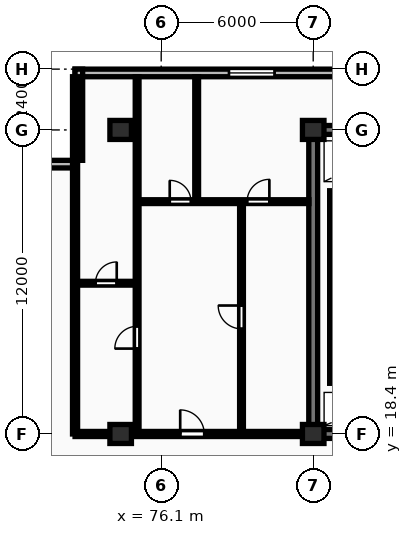
"""IFC4 building model, lengths in metres.
Left out: names, types, materials, properties, quantities, classifications, styles, units other than length and angle.
Written with IfcOpenShell. Run it as: python <this file> out.ifc"""

import sys

from ifc_helpers import new_model, si_unit, direction, frame, frame_2d, origin, origin_2d, place, context, subcontext, project, spatial, rectangle, extrude, element, fill, save


model = new_model("IFC4")
c1 = context("Model", 3, precision=1e-05, world=origin(), true_north=direction((0.0, 1.0)))
c2 = subcontext(c1, "Body", "Model", "MODEL_VIEW")
j1 = project(units=[si_unit("LENGTHUNIT", "METRE"), si_unit("PLANEANGLEUNIT", "RADIAN")], contexts=[c1])
p1 = place(None, origin())
s1 = spatial("IfcSite", under=j1, at=p1, CompositionType="ELEMENT")
p2 = place(p1, origin())
s2 = spatial("IfcBuilding", under=s1, at=p2, CompositionType="ELEMENT")
p3 = place(p2, frame((0.0, 0.0, 132.8)))
s3 = spatial("IfcBuildingStorey", under=s2, at=p3, CompositionType="ELEMENT", Elevation=132.8)
for number, where, z_axis, x_axis in (
    (1, (74.5, 18.4, 0.0), (0.0, 0.0, 1.0), (1.0, 0.0, 0.0)),
    (2, (74.5, 30.4, 0.0), (0.0, 0.0, 1.0), (1.0, 0.0, 0.0)),
    (3, (82.1, 18.4, 0.0), (0.0, 0.0, 1.0), (1.0, 0.0, 0.0)),
    (4, (82.1, 30.4, 0.0), (0.0, 0.0, 1.0), (1.0, 0.0, 0.0)),
):
    element("IfcColumn", number, at=place(p3, frame(where, z_axis=z_axis, x_axis=x_axis)), inside=s3, PredefinedType="COLUMN", context=c2, shape_type="SweptSolid", body=[
        extrude(rectangle(XDim=0.85, YDim=0.75, at=origin_2d()), origin(), (0.0, 0.0, 1.0), 3.25),
    ])
p4 = place(p3, frame((130.7, 32.65, 0.0), z_axis=(0.0, 0.0, 1.0), x_axis=(-1.0, 0.0, 0.0)))
e5 = element("IfcWall", 5, at=p4, inside=s3, PredefinedType="STANDARD", context=c2, shape_type="SweptSolid", body=[
    extrude(rectangle(XDim=58.0, YDim=0.3, at=frame_2d((29.0, 0.0))), origin(), (0.0, 0.0, 1.0), 2.97),
])
p5 = place(p4, frame((50.125, 0.0, 0.85)))
e6 = element("IfcOpeningElement", 6, at=p5, cuts=e5, PredefinedType="OPENING", context=c2, shape_type="SweptSolid", body=[
    extrude(rectangle(XDim=1.8, YDim=1.8, at=frame_2d((0.9, 0.9))), frame((0.0, 0.16, 0.0), z_axis=(0.0, -1.0, 0.0), x_axis=(1.0, 0.0, 0.0)), (0.0, 0.0, 1.0), 0.32),
])
p6 = place(p4, frame((6.775, 0.0, 0.85)))
e7 = element("IfcOpeningElement", 7, at=p6, cuts=e5, PredefinedType="OPENING", context=c2, shape_type="SweptSolid", body=[
    extrude(rectangle(XDim=1.8, YDim=1.8, at=frame_2d((0.9, 0.9))), frame((0.0, 0.16, 0.0), z_axis=(0.0, -1.0, 0.0), x_axis=(1.0, 0.0, 0.0)), (0.0, 0.0, 1.0), 0.32),
])
p7 = place(p3, frame((72.85, 32.8, 0.0), z_axis=(0.0, 0.0, 1.0), x_axis=(0.0, -1.0, 0.0)))
e8 = element("IfcWall", 8, at=p7, inside=s3, PredefinedType="STANDARD", context=c2, shape_type="SweptSolid", body=[
    extrude(rectangle(XDim=3.6, YDim=0.3, at=frame_2d((1.8, 0.0))), origin(), (0.0, 0.0, 1.0), 2.97),
])
p8 = place(p3, frame((72.7, 29.05, 0.0), z_axis=(0.0, 0.0, 1.0), x_axis=(-1.0, 0.0, 0.0)))
e9 = element("IfcWall", 9, at=p8, inside=s3, PredefinedType="STANDARD", context=c2, shape_type="SweptSolid", body=[
    extrude(rectangle(XDim=3.6, YDim=0.3, at=frame_2d((1.8, 0.0))), origin(), (0.0, 0.0, 1.0), 2.97),
])
p9 = place(p3, frame((81.925, 30.4, 0.0), z_axis=(0.0, 0.0, 1.0), x_axis=(1.0, 0.0, 0.0)))
e10 = element("IfcWall", 10, at=p9, inside=s3, PredefinedType="SHEAR", context=c2, shape_type="SweptSolid", body=[
    extrude(rectangle(XDim=36.265, YDim=0.35, at=frame_2d((18.132, 0.0))), origin(), (0.0, 0.0, 1.0), 3.25),
])
p10 = place(p3, frame((82.1, 18.575, 0.0), z_axis=(0.0, 0.0, 1.0), x_axis=(0.0, 1.0, 0.0)))
e11 = element("IfcWall", 11, at=p10, inside=s3, PredefinedType="SHEAR", context=c2, shape_type="SweptSolid", body=[
    extrude(rectangle(XDim=11.65, YDim=0.35, at=frame_2d((5.825, 0.0))), origin(), (0.0, 0.0, 1.0), 3.25),
])
p11 = place(p3, frame((81.925, 18.4, 0.0), z_axis=(0.0, 0.0, 1.0), x_axis=(1.0, 0.0, 0.0)))
e12 = element("IfcWall", 12, at=p11, inside=s3, PredefinedType="SHEAR", context=c2, shape_type="SweptSolid", body=[
    extrude(rectangle(XDim=36.265, YDim=0.35, at=frame_2d((18.132, 0.0))), origin(), (0.0, 0.0, 1.0), 3.25),
])
p12 = place(p11, frame((5.675, 0.0, 0.0)))
e13 = element("IfcOpeningElement", 13, at=p12, cuts=e12, PredefinedType="OPENING", context=c2, shape_type="SweptSolid", body=[
    extrude(rectangle(XDim=1.0, YDim=2.15, at=frame_2d((0.5, 1.075))), frame((0.0, 0.185, 0.0), z_axis=(0.0, -1.0, 0.0), x_axis=(1.0, 0.0, 0.0)), (0.0, 0.0, 1.0), 0.37),
])
p13 = place(p11, frame((21.925, 0.0, 0.0)))
e14 = element("IfcOpeningElement", 14, at=p13, cuts=e12, PredefinedType="OPENING", context=c2, shape_type="SweptSolid", body=[
    extrude(rectangle(XDim=1.5, YDim=2.2, at=frame_2d((0.75, 1.1))), frame((0.0, 0.185, 0.0), z_axis=(0.0, -1.0, 0.0), x_axis=(1.0, 0.0, 0.0)), (0.0, 0.0, 1.0), 0.37),
])
p14 = place(p11, frame((29.875, 0.0, 0.0)))
e15 = element("IfcOpeningElement", 15, at=p14, cuts=e12, PredefinedType="OPENING", context=c2, shape_type="SweptSolid", body=[
    extrude(rectangle(XDim=1.0, YDim=2.15, at=frame_2d((0.5, 1.075))), frame((0.0, 0.185, 0.0), z_axis=(0.0, -1.0, 0.0), x_axis=(1.0, 0.0, 0.0)), (0.0, 0.0, 1.0), 0.37),
])
p15 = place(p3, frame((82.875, 20.4, 0.0), z_axis=(0.0, 0.0, 1.0), x_axis=(0.0, 1.0, 0.0)))
e16 = element("IfcWall", 16, at=p15, inside=s3, PredefinedType="SHEAR", context=c2, shape_type="SweptSolid", body=[
    extrude(rectangle(XDim=7.6, YDim=0.25, at=frame_2d((3.8, 0.0))), origin(), (0.0, 0.0, 1.0), 3.25),
])
p16 = place(p3, frame((72.7, 18.4, 0.0), z_axis=(0.0, 0.0, 1.0), x_axis=(0.0, 1.0, 0.0)))
e17 = element("IfcWall", 17, at=p16, inside=s3, PredefinedType="PARTITIONING", context=c2, shape_type="SweptSolid", body=[
    extrude(rectangle(XDim=14.1, YDim=0.2, at=frame_2d((7.05, 0.0))), origin(), (0.0, 0.0, 1.0), 2.97),
])
p17 = place(p3, frame((72.7, 24.35, 0.0), z_axis=(0.0, 0.0, 1.0), x_axis=(1.0, 0.0, 0.0)))
e18 = element("IfcWall", 18, at=p17, inside=s3, PredefinedType="PARTITIONING", context=c2, shape_type="SweptSolid", body=[
    extrude(rectangle(XDim=2.45, YDim=0.15, at=frame_2d((1.225, 0.0))), origin(), (0.0, 0.0, 1.0), 2.97),
])
p18 = place(p17, frame((0.805, 0.0, 0.0)))
e19 = element("IfcOpeningElement", 19, at=p18, cuts=e18, PredefinedType="OPENING", context=c2, shape_type="SweptSolid", body=[
    extrude(rectangle(XDim=0.84, YDim=2.04, at=frame_2d((0.42, 1.02))), frame((0.0, 0.085, 0.0), z_axis=(0.0, -1.0, 0.0), x_axis=(1.0, 0.0, 0.0)), (0.0, 0.0, 1.0), 0.17),
])
p19 = place(p3, frame((75.15, 18.45, 0.0), z_axis=(0.0, 0.0, 1.0), x_axis=(0.0, 1.0, 0.0)))
e20 = element("IfcWall", 20, at=p19, inside=s3, PredefinedType="PARTITIONING", context=c2, shape_type="SweptSolid", body=[
    extrude(rectangle(XDim=14.05, YDim=0.15, at=frame_2d((7.025, 0.0))), origin(), (0.0, 0.0, 1.0), 2.97),
])
p20 = place(p19, frame((3.32, 0.0, 0.0)))
e21 = element("IfcOpeningElement", 21, at=p20, cuts=e20, PredefinedType="OPENING", context=c2, shape_type="SweptSolid", body=[
    extrude(rectangle(XDim=0.88, YDim=2.06, at=frame_2d((0.44, 1.03))), frame((0.0, 0.085, 0.0), z_axis=(0.0, -1.0, 0.0), x_axis=(1.0, 0.0, 0.0)), (0.0, 0.0, 1.0), 0.17),
])
p21 = place(p3, frame((79.27, 18.45, 0.0), z_axis=(0.0, 0.0, 1.0), x_axis=(0.0, 1.0, 0.0)))
e22 = element("IfcWall", 22, at=p21, inside=s3, PredefinedType="PARTITIONING", context=c2, shape_type="SweptSolid", body=[
    extrude(rectangle(XDim=9.12, YDim=0.15, at=frame_2d((4.56, 0.0))), origin(), (0.0, 0.0, 1.0), 2.97),
])
p22 = place(p21, frame((4.1, 0.0, 0.0)))
e23 = element("IfcOpeningElement", 23, at=p22, cuts=e22, PredefinedType="OPENING", context=c2, shape_type="SweptSolid", body=[
    extrude(rectangle(XDim=0.92, YDim=2.08, at=frame_2d((0.46, 1.04))), frame((0.0, 0.085, 0.0), z_axis=(0.0, -1.0, 0.0), x_axis=(1.0, 0.0, 0.0)), (0.0, 0.0, 1.0), 0.17),
])
p23 = place(p3, frame((77.5, 27.57, 0.0), z_axis=(0.0, 0.0, 1.0), x_axis=(0.0, 1.0, 0.0)))
e24 = element("IfcWall", 24, at=p23, inside=s3, PredefinedType="PARTITIONING", context=c2, shape_type="SweptSolid", body=[
    extrude(rectangle(XDim=4.93, YDim=0.15, at=frame_2d((2.465, 0.0))), origin(), (0.0, 0.0, 1.0), 2.97),
])
p24 = place(p3, frame((75.17, 27.57, 0.0), z_axis=(0.0, 0.0, 1.0), x_axis=(1.0, 0.0, 0.0)))
e25 = element("IfcWall", 25, at=p24, inside=s3, PredefinedType="PARTITIONING", context=c2, shape_type="SweptSolid", body=[
    extrude(rectangle(XDim=6.76, YDim=0.15, at=frame_2d((3.38, 0.0))), origin(), (0.0, 0.0, 1.0), 2.97),
])
p25 = place(p24, frame((1.266, 0.0, 0.0)))
e26 = element("IfcOpeningElement", 26, at=p25, cuts=e25, PredefinedType="OPENING", context=c2, shape_type="SweptSolid", body=[
    extrude(rectangle(XDim=0.84, YDim=2.04, at=frame_2d((0.42, 1.02))), frame((0.0, 0.085, 0.0), z_axis=(0.0, -1.0, 0.0), x_axis=(1.0, 0.0, 0.0)), (0.0, 0.0, 1.0), 0.17),
])
p26 = place(p24, frame((4.32, 0.0, 0.0)))
e27 = element("IfcOpeningElement", 27, at=p26, cuts=e25, PredefinedType="OPENING", context=c2, shape_type="SweptSolid", body=[
    extrude(rectangle(XDim=0.88, YDim=2.06, at=frame_2d((0.44, 1.03))), frame((0.0, 0.085, 0.0), z_axis=(0.0, -1.0, 0.0), x_axis=(1.0, 0.0, 0.0)), (0.0, 0.0, 1.0), 0.17),
])
p27 = place(p3, frame((72.7, 18.4, 0.0), z_axis=(0.0, 0.0, 1.0), x_axis=(1.0, 0.0, 0.0)))
e28 = element("IfcWall", 28, at=p27, inside=s3, PredefinedType="PARTITIONING", context=c2, shape_type="SweptSolid", body=[
    extrude(rectangle(XDim=9.25, YDim=0.2, at=frame_2d((4.625, 0.0))), origin(), (0.0, 0.0, 1.0), 2.358),
])
p28 = place(p27, frame((4.15, 0.0, 0.0)))
e29 = element("IfcOpeningElement", 29, at=p28, cuts=e28, PredefinedType="OPENING", context=c2, shape_type="SweptSolid", body=[
    extrude(rectangle(XDim=0.95, YDim=2.15, at=frame_2d((0.475, 1.075))), frame((0.0, 0.11, 0.0), z_axis=(0.0, -1.0, 0.0), x_axis=(1.0, 0.0, 0.0)), (0.0, 0.0, 1.0), 0.22),
])
p29 = place(p5, origin())
e30 = element("IfcWindow", 30, at=p29, inside=s3, PartitioningType="SINGLE_PANEL", PredefinedType="WINDOW", context=c2, shape_type="SweptSolid", body=[
    extrude(rectangle(XDim=1.8, YDim=1.8, at=frame_2d((0.9, 0.9))), frame((0.0, 0.03, 0.0), z_axis=(0.0, -1.0, 0.0), x_axis=(1.0, 0.0, 0.0)), (0.0, 0.0, 1.0), 0.06),
])
fill(e6, e30)
p30 = place(p18, origin())
e31 = element("IfcDoor", 31, at=p30, inside=s3, OperationType="SINGLE_SWING_RIGHT", PredefinedType="DOOR", context=c2, shape_type="SweptSolid", body=[
    extrude(rectangle(XDim=0.84, YDim=2.04, at=frame_2d((0.42, 1.02))), frame((0.0, 0.025, 0.0), z_axis=(0.0, -1.0, 0.0), x_axis=(1.0, 0.0, 0.0)), (0.0, 0.0, 1.0), 0.05),
])
fill(e19, e31)
p31 = place(p20, origin())
e32 = element("IfcDoor", 32, at=p31, inside=s3, OperationType="SINGLE_SWING_LEFT", PredefinedType="DOOR", context=c2, shape_type="SweptSolid", body=[
    extrude(rectangle(XDim=0.88, YDim=2.06, at=frame_2d((0.44, 1.03))), frame((0.0, 0.025, 0.0), z_axis=(0.0, -1.0, 0.0), x_axis=(1.0, 0.0, 0.0)), (0.0, 0.0, 1.0), 0.05),
])
fill(e21, e32)
p32 = place(p22, origin())
e33 = element("IfcDoor", 33, at=p32, inside=s3, OperationType="SINGLE_SWING_RIGHT", PredefinedType="DOOR", context=c2, shape_type="SweptSolid", body=[
    extrude(rectangle(XDim=0.92, YDim=2.08, at=frame_2d((0.46, 1.04))), frame((0.0, 0.025, 0.0), z_axis=(0.0, -1.0, 0.0), x_axis=(1.0, 0.0, 0.0)), (0.0, 0.0, 1.0), 0.05),
])
fill(e23, e33)
p33 = place(p25, origin())
e34 = element("IfcDoor", 34, at=p33, inside=s3, OperationType="SINGLE_SWING_LEFT", PredefinedType="DOOR", context=c2, shape_type="SweptSolid", body=[
    extrude(rectangle(XDim=0.84, YDim=2.04, at=frame_2d((0.42, 1.02))), frame((0.0, 0.025, 0.0), z_axis=(0.0, -1.0, 0.0), x_axis=(1.0, 0.0, 0.0)), (0.0, 0.0, 1.0), 0.05),
])
fill(e26, e34)
p34 = place(p26, origin())
e35 = element("IfcDoor", 35, at=p34, inside=s3, OperationType="SINGLE_SWING_RIGHT", PredefinedType="DOOR", context=c2, shape_type="SweptSolid", body=[
    extrude(rectangle(XDim=0.88, YDim=2.06, at=frame_2d((0.44, 1.03))), frame((0.0, 0.025, 0.0), z_axis=(0.0, -1.0, 0.0), x_axis=(1.0, 0.0, 0.0)), (0.0, 0.0, 1.0), 0.05),
])
fill(e27, e35)
p35 = place(p28, origin())
e36 = element("IfcDoor", 36, at=p35, inside=s3, OperationType="SINGLE_SWING_LEFT", PredefinedType="DOOR", context=c2, shape_type="SweptSolid", body=[
    extrude(rectangle(XDim=0.95, YDim=2.15, at=frame_2d((0.475, 1.075))), frame((0.0, 0.025, 0.0), z_axis=(0.0, -1.0, 0.0), x_axis=(1.0, 0.0, 0.0)), (0.0, 0.0, 1.0), 0.05),
])
fill(e29, e36)
save(model, sys.argv[1])
